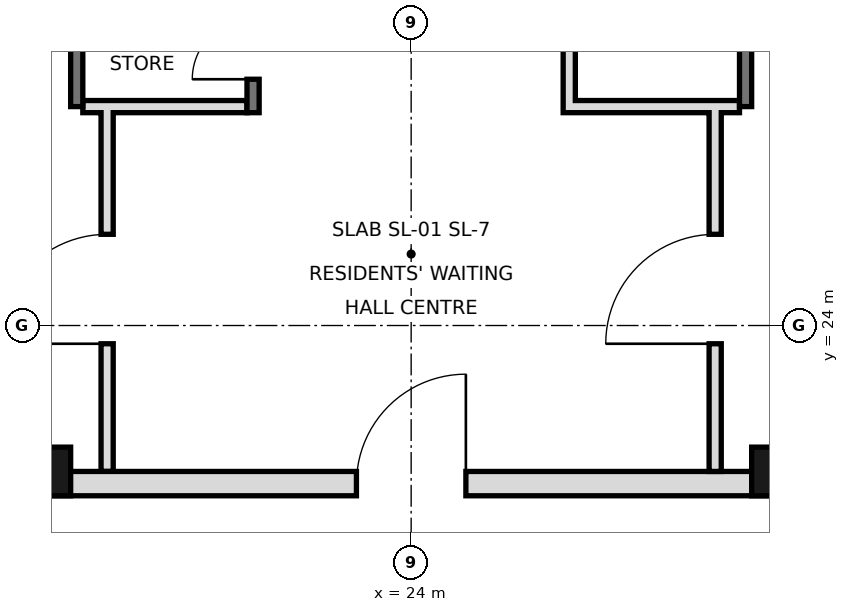
"""IFC4 building model, lengths in metres.
Left out: names, types, materials, properties, quantities, classifications, styles, units other than length and angle.
Written with IfcOpenShell. Run it as: python <this file> out.ifc"""

import sys

from ifc_helpers import new_model, si_unit, direction, frame, frame_2d, origin, origin_2d, place, context, subcontext, project, spatial, rectangle, hollow_rectangle, extrude, element, fill, save


model = new_model("IFC4")
c1 = context("Model", 3, precision=1e-05, world=origin(), true_north=direction((0.0, 1.0)))
c2 = subcontext(c1, "Body", "Model", "MODEL_VIEW")
j1 = project(units=[si_unit("LENGTHUNIT", "METRE"), si_unit("PLANEANGLEUNIT", "RADIAN")], contexts=[c1])
p1 = place(None, origin())
s1 = spatial("IfcSite", under=j1, at=p1, CompositionType="ELEMENT")
p2 = place(p1, origin())
s2 = spatial("IfcBuilding", under=s1, at=p2, CompositionType="ELEMENT")
p3 = place(p2, frame((0.0, 0.0, 270.2)))
s3 = spatial("IfcBuildingStorey", under=s2, at=p3, CompositionType="ELEMENT", Elevation=270.2)
for number, where, z_axis, x_axis in (
    (1, (18.0, 21.6, 0.0), (0.0, 0.0, 1.0), (1.0, 0.0, 0.0)),
    (2, (30.0, 21.6, 0.0), (0.0, 0.0, 1.0), (1.0, 0.0, 0.0)),
):
    element("IfcColumn", number, at=place(p3, frame(where, z_axis=z_axis, x_axis=x_axis)), inside=s3, PredefinedType="COLUMN", context=c2, shape_type="SweptSolid", body=[
        extrude(hollow_rectangle(XDim=0.8, YDim=0.8, WallThickness=0.032, at=origin_2d()), origin(), (0.0, 0.0, 1.0), 3.6),
    ])
for number, where, z_axis, x_axis in (
    (3, (18.5, 27.6, 0.0), (0.0, 0.0, 1.0), (0.0, 1.0, 0.0)),
    (4, (29.5, 27.6, 0.0), (0.0, 0.0, 1.0), (0.0, 1.0, 0.0)),
):
    element("IfcWall", number, at=place(p3, frame(where, z_axis=z_axis, x_axis=x_axis)), inside=s3, PredefinedType="SOLIDWALL", context=c2, shape_type="SweptSolid", body=[
        extrude(rectangle(XDim=17.5, YDim=0.2, at=frame_2d((8.75, 0.0))), origin(), (0.0, 0.0, 1.0), 3.42),
    ])
p4 = place(p3, frame((5.6, 21.4, 0.0), z_axis=(0.0, 0.0, 1.0), x_axis=(1.0, 0.0, 0.0)))
e5 = element("IfcWall", 5, at=p4, inside=s3, PredefinedType="SOLIDWALL", context=c2, shape_type="SweptSolid", body=[
    extrude(rectangle(XDim=36.8, YDim=0.4, at=frame_2d((18.4, 0.0))), origin(), (0.0, 0.0, 1.0), 3.42),
])
p5 = place(p4, frame((8.5, 0.0, 0.0)))
e6 = element("IfcOpeningElement", 6, at=p5, cuts=e5, PredefinedType="OPENING", context=c2, shape_type="SweptSolid", body=[
    extrude(rectangle(XDim=1.8, YDim=2.1, at=frame_2d((0.9, 1.05))), frame((0.0, 0.21, 0.0), z_axis=(0.0, -1.0, 0.0), x_axis=(1.0, 0.0, 0.0)), (0.0, 0.0, 1.0), 0.42),
])
p6 = place(p4, frame((17.5, 0.0, 0.0)))
e7 = element("IfcOpeningElement", 7, at=p6, cuts=e5, PredefinedType="OPENING", context=c2, shape_type="SweptSolid", body=[
    extrude(rectangle(XDim=1.8, YDim=2.1, at=frame_2d((0.9, 1.05))), frame((0.0, 0.21, 0.0), z_axis=(0.0, -1.0, 0.0), x_axis=(1.0, 0.0, 0.0)), (0.0, 0.0, 1.0), 0.42),
])
p7 = place(p4, frame((26.5, 0.0, 0.0)))
e8 = element("IfcOpeningElement", 8, at=p7, cuts=e5, PredefinedType="OPENING", context=c2, shape_type="SweptSolid", body=[
    extrude(rectangle(XDim=1.8, YDim=2.1, at=frame_2d((0.9, 1.05))), frame((0.0, 0.21, 0.0), z_axis=(0.0, -1.0, 0.0), x_axis=(1.0, 0.0, 0.0)), (0.0, 0.0, 1.0), 0.42),
])
p8 = place(p4, frame((4.5, 0.0, 0.0)))
e9 = element("IfcOpeningElement", 9, at=p8, cuts=e5, PredefinedType="OPENING", context=c2, shape_type="SweptSolid", body=[
    extrude(rectangle(XDim=1.2, YDim=2.1, at=frame_2d((0.6, 1.05))), frame((0.0, 0.21, 0.0), z_axis=(0.0, -1.0, 0.0), x_axis=(1.0, 0.0, 0.0)), (0.0, 0.0, 1.0), 0.42),
])
p9 = place(p4, frame((31.1, 0.0, 0.0)))
e10 = element("IfcOpeningElement", 10, at=p9, cuts=e5, PredefinedType="OPENING", context=c2, shape_type="SweptSolid", body=[
    extrude(rectangle(XDim=1.2, YDim=2.1, at=frame_2d((0.6, 1.05))), frame((0.0, 0.21, 0.0), z_axis=(0.0, -1.0, 0.0), x_axis=(1.0, 0.0, 0.0)), (0.0, 0.0, 1.0), 0.42),
])
p10 = place(p3, frame((19.0, 21.6, 0.0), z_axis=(0.0, 0.0, 1.0), x_axis=(0.0, 1.0, 0.0)))
e11 = element("IfcWall", 11, at=p10, inside=s3, PredefinedType="PARTITIONING", context=c2, shape_type="SweptSolid", body=[
    extrude(rectangle(XDim=6.0, YDim=0.2, at=frame_2d((3.0, 0.0))), origin(), (0.0, 0.0, 1.0), 3.42),
])
p11 = place(p10, frame((2.1, 0.0, 0.0)))
e12 = element("IfcOpeningElement", 12, at=p11, cuts=e11, PredefinedType="OPENING", context=c2, shape_type="SweptSolid", body=[
    extrude(rectangle(XDim=1.8, YDim=2.1, at=frame_2d((0.9, 1.05))), frame((0.0, 0.11, 0.0), z_axis=(0.0, -1.0, 0.0), x_axis=(1.0, 0.0, 0.0)), (0.0, 0.0, 1.0), 0.22),
])
p12 = place(p3, frame((29.0, 21.6, 0.0), z_axis=(0.0, 0.0, 1.0), x_axis=(0.0, 1.0, 0.0)))
e13 = element("IfcWall", 13, at=p12, inside=s3, PredefinedType="PARTITIONING", context=c2, shape_type="SweptSolid", body=[
    extrude(rectangle(XDim=6.0, YDim=0.2, at=frame_2d((3.0, 0.0))), origin(), (0.0, 0.0, 1.0), 3.42),
])
p13 = place(p12, frame((2.1, 0.0, 0.0)))
e14 = element("IfcOpeningElement", 14, at=p13, cuts=e13, PredefinedType="OPENING", context=c2, shape_type="SweptSolid", body=[
    extrude(rectangle(XDim=1.8, YDim=2.1, at=frame_2d((0.9, 1.05))), frame((0.0, 0.11, 0.0), z_axis=(0.0, -1.0, 0.0), x_axis=(1.0, 0.0, 0.0)), (0.0, 0.0, 1.0), 0.22),
])
p14 = place(p3, frame((21.4, 27.5, 0.0), z_axis=(0.0, 0.0, 1.0), x_axis=(0.0, 1.0, 0.0)))
e15 = element("IfcWall", 15, at=p14, inside=s3, PredefinedType="SOLIDWALL", context=c2, shape_type="SweptSolid", body=[
    extrude(rectangle(XDim=17.5, YDim=0.2, at=frame_2d((8.75, 0.0))), origin(), (0.0, 0.0, 1.0), 3.42),
])
p15 = place(p14, frame((0.55, 0.0, 0.0)))
e16 = element("IfcOpeningElement", 16, at=p15, cuts=e15, PredefinedType="OPENING", context=c2, shape_type="SweptSolid", body=[
    extrude(rectangle(XDim=1.0, YDim=2.1, at=frame_2d((0.5, 1.05))), frame((0.0, 0.11, 0.0), z_axis=(0.0, -1.0, 0.0), x_axis=(1.0, 0.0, 0.0)), (0.0, 0.0, 1.0), 0.22),
])
p16 = place(p14, frame((3.65, 0.0, 0.0)))
e17 = element("IfcOpeningElement", 17, at=p16, cuts=e15, PredefinedType="OPENING", context=c2, shape_type="SweptSolid", body=[
    extrude(rectangle(XDim=1.0, YDim=2.1, at=frame_2d((0.5, 1.05))), frame((0.0, 0.11, 0.0), z_axis=(0.0, -1.0, 0.0), x_axis=(1.0, 0.0, 0.0)), (0.0, 0.0, 1.0), 0.22),
])
p17 = place(p14, frame((9.8, 0.0, 0.0)))
e18 = element("IfcOpeningElement", 18, at=p17, cuts=e15, PredefinedType="OPENING", context=c2, shape_type="SweptSolid", body=[
    extrude(rectangle(XDim=1.0, YDim=2.1, at=frame_2d((0.5, 1.05))), frame((0.0, 0.11, 0.0), z_axis=(0.0, -1.0, 0.0), x_axis=(1.0, 0.0, 0.0)), (0.0, 0.0, 1.0), 0.22),
])
p18 = place(p14, frame((7.4, 0.0, 0.0)))
e19 = element("IfcOpeningElement", 19, at=p18, cuts=e15, PredefinedType="OPENING", context=c2, shape_type="SweptSolid", body=[
    extrude(rectangle(XDim=0.9, YDim=2.1, at=frame_2d((0.45, 1.05))), frame((0.0, 0.11, 0.0), z_axis=(0.0, -1.0, 0.0), x_axis=(1.0, 0.0, 0.0)), (0.0, 0.0, 1.0), 0.22),
])
p19 = place(p3, frame((26.6, 27.5, 0.0), z_axis=(0.0, 0.0, 1.0), x_axis=(0.0, 1.0, 0.0)))
e20 = element("IfcWall", 20, at=p19, inside=s3, PredefinedType="SOLIDWALL", context=c2, shape_type="SweptSolid", body=[
    extrude(rectangle(XDim=17.5, YDim=0.2, at=frame_2d((8.75, 0.0))), origin(), (0.0, 0.0, 1.0), 3.42),
])
p20 = place(p19, frame((4.3, 0.0, 0.0)))
e21 = element("IfcOpeningElement", 21, at=p20, cuts=e20, PredefinedType="OPENING", context=c2, shape_type="SweptSolid", body=[
    extrude(rectangle(XDim=0.9, YDim=2.1, at=frame_2d((0.45, 1.05))), frame((0.0, 0.11, 0.0), z_axis=(0.0, -1.0, 0.0), x_axis=(1.0, 0.0, 0.0)), (0.0, 0.0, 1.0), 0.22),
])
p21 = place(p19, frame((10.35, 0.0, 0.0)))
e22 = element("IfcOpeningElement", 22, at=p21, cuts=e20, PredefinedType="OPENING", context=c2, shape_type="SweptSolid", body=[
    extrude(rectangle(XDim=1.0, YDim=2.1, at=frame_2d((0.5, 1.05))), frame((0.0, 0.11, 0.0), z_axis=(0.0, -1.0, 0.0), x_axis=(1.0, 0.0, 0.0)), (0.0, 0.0, 1.0), 0.22),
])
p22 = place(p19, frame((15.475, 0.0, 0.0)))
e23 = element("IfcOpeningElement", 23, at=p22, cuts=e20, PredefinedType="OPENING", context=c2, shape_type="SweptSolid", body=[
    extrude(rectangle(XDim=1.0, YDim=2.1, at=frame_2d((0.5, 1.05))), frame((0.0, 0.11, 0.0), z_axis=(0.0, -1.0, 0.0), x_axis=(1.0, 0.0, 0.0)), (0.0, 0.0, 1.0), 0.22),
])
p23 = place(p3, frame((18.6, 27.6, 0.0), z_axis=(0.0, 0.0, 1.0), x_axis=(1.0, 0.0, 0.0)))
e24 = element("IfcWall", 24, at=p23, inside=s3, PredefinedType="PARTITIONING", context=c2, shape_type="SweptSolid", body=[
    extrude(rectangle(XDim=2.7, YDim=0.2, at=frame_2d((1.35, 0.0))), origin(), (0.0, 0.0, 1.0), 3.42),
])
p24 = place(p3, frame((26.7, 27.6, 0.0), z_axis=(0.0, 0.0, 1.0), x_axis=(1.0, 0.0, 0.0)))
e25 = element("IfcWall", 25, at=p24, inside=s3, PredefinedType="SOLIDWALL", context=c2, shape_type="SweptSolid", body=[
    extrude(rectangle(XDim=2.7, YDim=0.2, at=frame_2d((1.35, 0.0))), origin(), (0.0, 0.0, 1.0), 3.42),
])
p25 = place(p11, origin())
e26 = element("IfcDoor", 26, at=p25, inside=s3, OperationType="SINGLE_SWING_LEFT", PredefinedType="DOOR", context=c2, shape_type="SweptSolid", body=[
    extrude(rectangle(XDim=1.8, YDim=2.1, at=frame_2d((0.9, 1.05))), frame((0.0, 0.025, 0.0), z_axis=(0.0, -1.0, 0.0), x_axis=(1.0, 0.0, 0.0)), (0.0, 0.0, 1.0), 0.05),
])
fill(e12, e26)
p26 = place(p6, frame((1.8, 0.0, 0.0), z_axis=(0.0, 0.0, 1.0), x_axis=(-1.0, 0.0, 0.0)))
e27 = element("IfcDoor", 27, at=p26, inside=s3, OperationType="SINGLE_SWING_LEFT", PredefinedType="DOOR", context=c2, shape_type="SweptSolid", body=[
    extrude(rectangle(XDim=1.8, YDim=2.1, at=frame_2d((0.9, 1.05))), frame((0.0, 0.025, 0.0), z_axis=(0.0, -1.0, 0.0), x_axis=(1.0, 0.0, 0.0)), (0.0, 0.0, 1.0), 0.05),
])
fill(e7, e27)
p27 = place(p13, origin())
e28 = element("IfcDoor", 28, at=p27, inside=s3, OperationType="SINGLE_SWING_LEFT", PredefinedType="DOOR", context=c2, shape_type="SweptSolid", body=[
    extrude(rectangle(XDim=1.8, YDim=2.1, at=frame_2d((0.9, 1.05))), frame((0.0, 0.025, 0.0), z_axis=(0.0, -1.0, 0.0), x_axis=(1.0, 0.0, 0.0)), (0.0, 0.0, 1.0), 0.05),
])
fill(e14, e28)
p28 = place(p15, origin())
e29 = element("IfcDoor", 29, at=p28, inside=s3, OperationType="SINGLE_SWING_LEFT", PredefinedType="DOOR", context=c2, shape_type="SweptSolid", body=[
    extrude(rectangle(XDim=1.0, YDim=2.1, at=frame_2d((0.5, 1.05))), frame((0.0, 0.025, 0.0), z_axis=(0.0, -1.0, 0.0), x_axis=(1.0, 0.0, 0.0)), (0.0, 0.0, 1.0), 0.05),
])
fill(e16, e29)
save(model, sys.argv[1])
